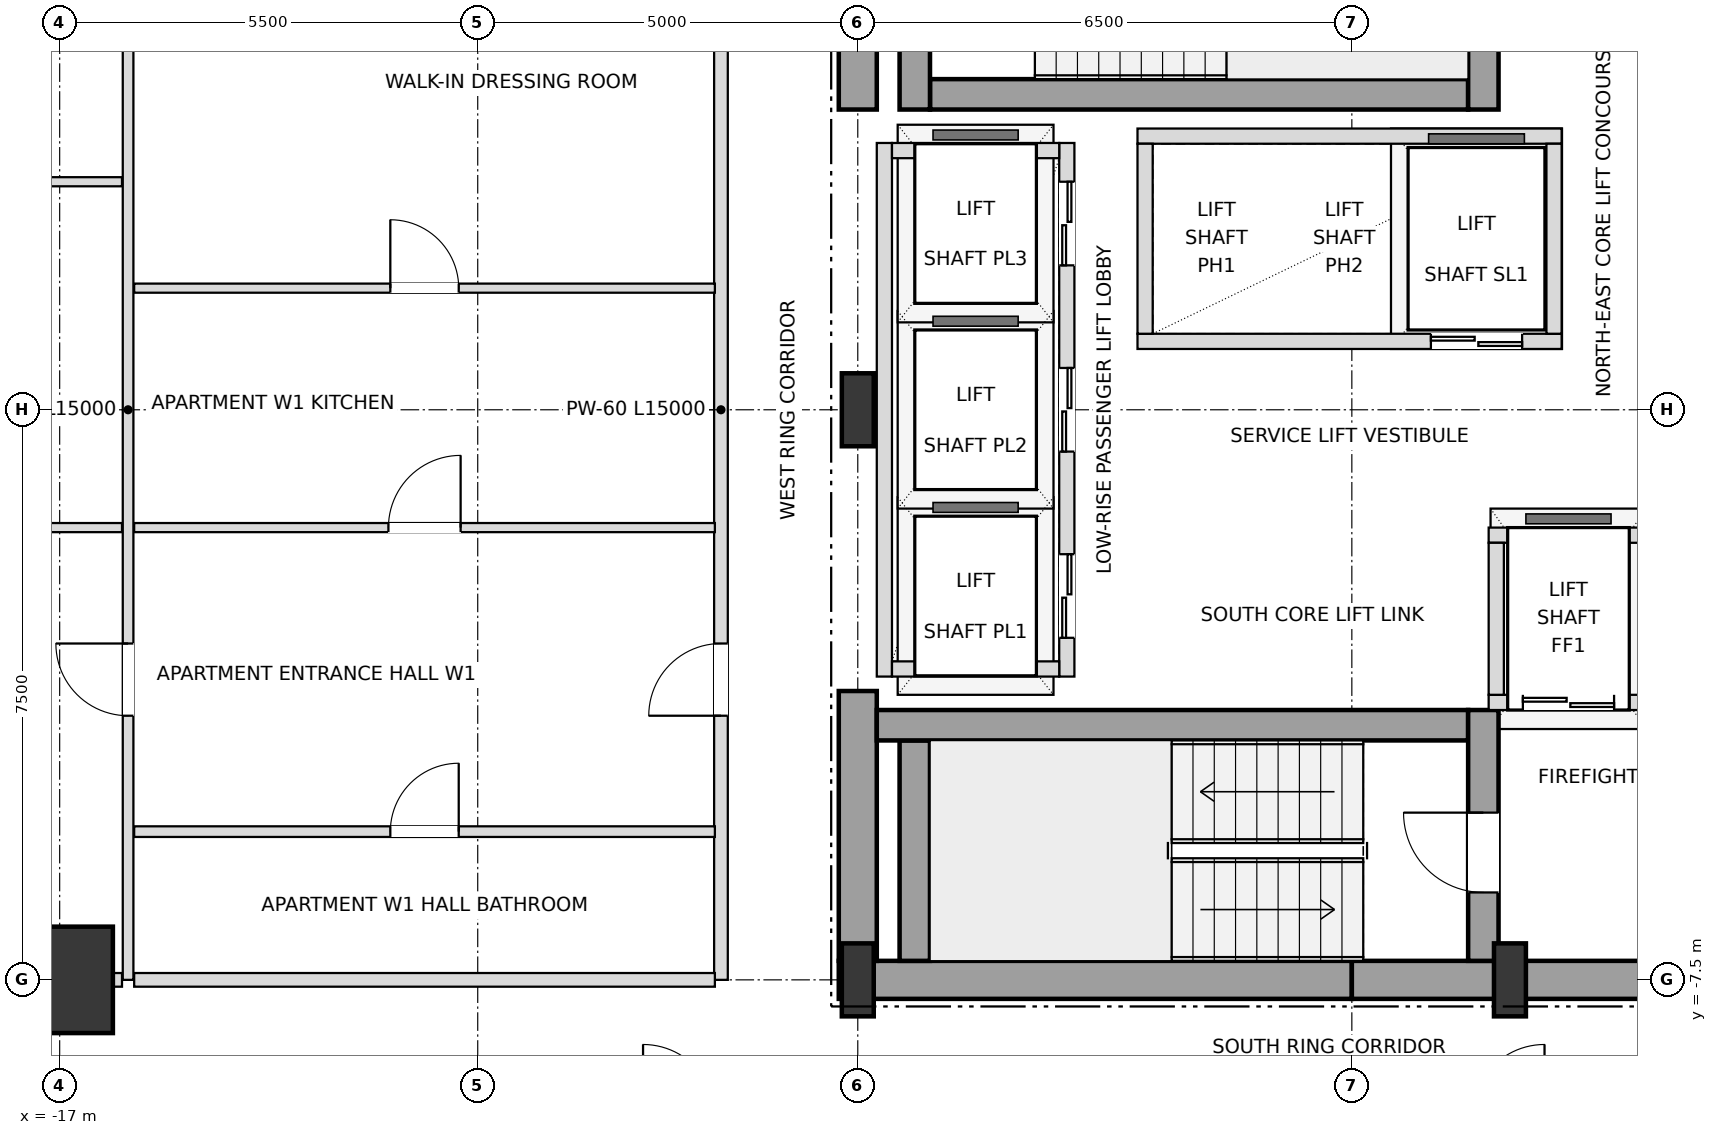
"""IFC4 building model, lengths in metres.
Left out: names, types, materials, properties, quantities, classifications, styles, units other than length and angle.
Written with IfcOpenShell. Run it as: python <this file> out.ifc"""

import sys

from ifc_helpers import new_model, si_unit, direction, frame, frame_2d, origin, origin_2d, place, context, subcontext, project, spatial, rectangle, i_section, extrude, element, fill, save


model = new_model("IFC4")
c1 = context("Model", 3, precision=1e-05, world=origin(), true_north=direction((0.0, 1.0)))
c2 = subcontext(c1, "Body", "Model", "MODEL_VIEW")
j1 = project(units=[si_unit("LENGTHUNIT", "METRE"), si_unit("PLANEANGLEUNIT", "RADIAN")], contexts=[c1])
p1 = place(None, origin())
s1 = spatial("IfcSite", under=j1, at=p1, CompositionType="ELEMENT")
p2 = place(p1, origin())
s2 = spatial("IfcBuilding", under=s1, at=p2, CompositionType="ELEMENT")
p3 = place(p2, frame((0.0, 0.0, 64.8)))
s3 = spatial("IfcBuildingStorey", under=s2, at=p3, CompositionType="ELEMENT", Elevation=64.8)
for number, where, z_axis, x_axis in (
    (1, (-6.5, -7.5, 0.0), (0.0, 0.0, 1.0), (1.0, 0.0, 0.0)),
    (2, (2.08, -7.5, 0.0), (0.0, 0.0, 1.0), (1.0, 0.0, 0.0)),
    (3, (-6.5, 0.0, 0.0), (0.0, 0.0, 1.0), (1.0, 0.0, 0.0)),
):
    element("IfcColumn", number, at=place(p3, frame(where, z_axis=z_axis, x_axis=x_axis)), inside=s3, PredefinedType="COLUMN", context=c2, shape_type="SweptSolid", body=[
        extrude(i_section(OverallWidth=0.42, OverallDepth=0.96, WebThickness=0.022, FlangeThickness=0.034, at=origin_2d()), origin(), (0.0, 0.0, 1.0), 3.6),
    ])
p4 = place(p3, frame((-17.0, -7.5, 0.0), z_axis=(0.0, 0.0, 1.0), x_axis=(1.0, 0.0, 0.0)))
e4 = element("IfcColumn", 4, at=p4, inside=s3, PredefinedType="USERDEFINED", context=c2, shape_type="SweptSolid", body=[
    extrude(rectangle(XDim=1.4, YDim=1.4, at=origin_2d()), origin(), (0.0, 0.0, 1.0), 3.6),
])
for number, where, z_axis, x_axis in (
    (5, (-6.75, -7.5, 0.0), (0.0, 0.0, 1.0), (1.0, 0.0, 0.0)),
    (6, (0.0, -7.5, 0.0), (0.0, 0.0, 1.0), (1.0, 0.0, 0.0)),
):
    element("IfcWall", number, at=place(p3, frame(where, z_axis=z_axis, x_axis=x_axis)), inside=s3, PredefinedType="SHEAR", context=c2, shape_type="SweptSolid", body=[
        extrude(rectangle(XDim=6.75, YDim=0.5, at=frame_2d((3.375, 0.0))), origin(), (0.0, 0.0, 1.0), 3.38),
    ])
p5 = place(p3, frame((-6.5, -7.25, 0.0), z_axis=(0.0, 0.0, 1.0), x_axis=(0.0, 1.0, 0.0)))
e7 = element("IfcWall", 7, at=p5, inside=s3, PredefinedType="SHEAR", context=c2, shape_type="SweptSolid", body=[
    extrude(rectangle(XDim=3.55, YDim=0.5, at=frame_2d((1.775, 0.0))), origin(), (0.0, 0.0, 1.0), 3.38),
])
p6 = place(p3, frame((-6.5, 3.95, 0.0), z_axis=(0.0, 0.0, 1.0), x_axis=(0.0, 1.0, 0.0)))
e8 = element("IfcWall", 8, at=p6, inside=s3, PredefinedType="SHEAR", context=c2, shape_type="SweptSolid", body=[
    extrude(rectangle(XDim=3.3, YDim=0.5, at=frame_2d((1.65, 0.0))), origin(), (0.0, 0.0, 1.0), 3.38),
])
p7 = place(p3, frame((-5.75, -7.25, 0.0), z_axis=(0.0, 0.0, 1.0), x_axis=(0.0, 1.0, 0.0)))
e9 = element("IfcWall", 9, at=p7, inside=s3, PredefinedType="SHEAR", context=c2, shape_type="SweptSolid", body=[
    extrude(rectangle(XDim=2.9, YDim=0.4, at=frame_2d((1.45, 0.0))), origin(), (0.0, 0.0, 1.0), 3.38),
])
p8 = place(p3, frame((-6.25, -4.15, 0.0), z_axis=(0.0, 0.0, 1.0), x_axis=(1.0, 0.0, 0.0)))
e10 = element("IfcWall", 10, at=p8, inside=s3, PredefinedType="SHEAR", context=c2, shape_type="SweptSolid", body=[
    extrude(rectangle(XDim=7.78, YDim=0.4, at=frame_2d((3.89, 0.0))), origin(), (0.0, 0.0, 1.0), 3.38),
])
p9 = place(p3, frame((1.73, -7.25, 0.0), z_axis=(0.0, 0.0, 1.0), x_axis=(0.0, 1.0, 0.0)))
e11 = element("IfcWall", 11, at=p9, inside=s3, PredefinedType="SHEAR", context=c2, shape_type="SweptSolid", body=[
    extrude(rectangle(XDim=3.3, YDim=0.4, at=frame_2d((1.65, 0.0))), origin(), (0.0, 0.0, 1.0), 3.38),
])
p10 = place(p9, frame((0.9, 0.0, 0.0)))
e12 = element("IfcOpeningElement", 12, at=p10, cuts=e11, PredefinedType="OPENING", context=c2, shape_type="SweptSolid", body=[
    extrude(rectangle(XDim=1.05, YDim=2.15, at=frame_2d((0.525, 1.075))), frame((0.0, 0.21, 0.0), z_axis=(0.0, -1.0, 0.0), x_axis=(1.0, 0.0, 0.0)), (0.0, 0.0, 1.0), 0.42),
])
p11 = place(p3, frame((-5.55, 4.15, 0.0), z_axis=(0.0, 0.0, 1.0), x_axis=(1.0, 0.0, 0.0)))
e13 = element("IfcWall", 13, at=p11, inside=s3, PredefinedType="SHEAR", context=c2, shape_type="SweptSolid", body=[
    extrude(rectangle(XDim=7.08, YDim=0.4, at=frame_2d((3.54, 0.0))), origin(), (0.0, 0.0, 1.0), 3.38),
])
for number, where, z_axis, x_axis in (
    (14, (1.73, 3.95, 0.0), (0.0, 0.0, 1.0), (0.0, 1.0, 0.0)),
    (15, (-5.75, 3.95, 0.0), (0.0, 0.0, 1.0), (0.0, 1.0, 0.0)),
):
    element("IfcWall", number, at=place(p3, frame(where, z_axis=z_axis, x_axis=x_axis)), inside=s3, PredefinedType="SHEAR", context=c2, shape_type="SweptSolid", body=[
        extrude(rectangle(XDim=3.3, YDim=0.4, at=frame_2d((1.65, 0.0))), origin(), (0.0, 0.0, 1.0), 3.38),
    ])
p12 = place(p3, frame((-3.75, -3.51, 0.0), z_axis=(0.0, 0.0, 1.0), x_axis=(0.0, 1.0, 0.0)))
e16 = element("IfcWall", 16, at=p12, inside=s3, PredefinedType="SOLIDWALL", context=c2, shape_type="SweptSolid", body=[
    extrude(rectangle(XDim=7.02, YDim=0.2, at=frame_2d((3.51, 0.0))), origin(), (0.0, 0.0, 1.0), 3.38),
])
p13 = place(p12, frame((0.51, 0.0, 0.0)))
e17 = element("IfcOpeningElement", 17, at=p13, cuts=e16, PredefinedType="OPENING", context=c2, shape_type="SweptSolid", body=[
    extrude(rectangle(XDim=1.1, YDim=2.15, at=frame_2d((0.55, 1.075))), frame((0.0, 0.11, 0.0), z_axis=(0.0, -1.0, 0.0), x_axis=(1.0, 0.0, 0.0)), (0.0, 0.0, 1.0), 0.22),
])
p14 = place(p12, frame((2.96, 0.0, 0.0)))
e18 = element("IfcOpeningElement", 18, at=p14, cuts=e16, PredefinedType="OPENING", context=c2, shape_type="SweptSolid", body=[
    extrude(rectangle(XDim=1.1, YDim=2.15, at=frame_2d((0.55, 1.075))), frame((0.0, 0.11, 0.0), z_axis=(0.0, -1.0, 0.0), x_axis=(1.0, 0.0, 0.0)), (0.0, 0.0, 1.0), 0.22),
])
p15 = place(p12, frame((5.41, 0.0, 0.0)))
e19 = element("IfcOpeningElement", 19, at=p15, cuts=e16, PredefinedType="OPENING", context=c2, shape_type="SweptSolid", body=[
    extrude(rectangle(XDim=1.1, YDim=2.15, at=frame_2d((0.55, 1.075))), frame((0.0, 0.11, 0.0), z_axis=(0.0, -1.0, 0.0), x_axis=(1.0, 0.0, 0.0)), (0.0, 0.0, 1.0), 0.22),
])
p16 = place(p3, frame((-6.15, -3.51, 0.0), z_axis=(0.0, 0.0, 1.0), x_axis=(0.0, 1.0, 0.0)))
e20 = element("IfcWall", 20, at=p16, inside=s3, PredefinedType="SOLIDWALL", context=c2, shape_type="SweptSolid", body=[
    extrude(rectangle(XDim=7.02, YDim=0.2, at=frame_2d((3.51, 0.0))), origin(), (0.0, 0.0, 1.0), 3.38),
])
for number, where, z_axis, x_axis in (
    (21, (-6.05, -3.41, 0.0), (0.0, 0.0, 1.0), (1.0, 0.0, 0.0)),
    (22, (-6.05, 3.41, 0.0), (0.0, 0.0, 1.0), (1.0, 0.0, 0.0)),
):
    element("IfcWall", number, at=place(p3, frame(where, z_axis=z_axis, x_axis=x_axis)), inside=s3, PredefinedType="SOLIDWALL", context=c2, shape_type="SweptSolid", body=[
        extrude(rectangle(XDim=2.2, YDim=0.2, at=frame_2d((1.1, 0.0))), origin(), (0.0, 0.0, 1.0), 3.38),
    ])
p17 = place(p3, frame((-2.82, 0.9, 0.0), z_axis=(0.0, 0.0, 1.0), x_axis=(1.0, 0.0, 0.0)))
e23 = element("IfcWall", 23, at=p17, inside=s3, PredefinedType="SOLIDWALL", context=c2, shape_type="SweptSolid", body=[
    extrude(rectangle(XDim=5.58, YDim=0.2, at=frame_2d((2.79, 0.0))), origin(), (0.0, 0.0, 1.0), 3.38),
])
p18 = place(p17, frame((3.86, 0.0, 0.0)))
e24 = element("IfcOpeningElement", 24, at=p18, cuts=e23, PredefinedType="OPENING", context=c2, shape_type="SweptSolid", body=[
    extrude(rectangle(XDim=1.2, YDim=2.2, at=frame_2d((0.6, 1.1))), frame((0.0, 0.11, 0.0), z_axis=(0.0, -1.0, 0.0), x_axis=(1.0, 0.0, 0.0)), (0.0, 0.0, 1.0), 0.22),
])
p19 = place(p3, frame((-2.82, 3.6, 0.0), z_axis=(0.0, 0.0, 1.0), x_axis=(1.0, 0.0, 0.0)))
e25 = element("IfcWall", 25, at=p19, inside=s3, PredefinedType="SOLIDWALL", context=c2, shape_type="SweptSolid", body=[
    extrude(rectangle(XDim=5.58, YDim=0.2, at=frame_2d((2.79, 0.0))), origin(), (0.0, 0.0, 1.0), 3.38),
])
for number, where, z_axis, x_axis in (
    (26, (-2.72, 1.0, 0.0), (0.0, 0.0, 1.0), (0.0, 1.0, 0.0)),
    (27, (2.66, 1.0, 0.0), (0.0, 0.0, 1.0), (0.0, 1.0, 0.0)),
):
    element("IfcWall", number, at=place(p3, frame(where, z_axis=z_axis, x_axis=x_axis)), inside=s3, PredefinedType="SOLIDWALL", context=c2, shape_type="SweptSolid", body=[
        extrude(rectangle(XDim=2.5, YDim=0.2, at=frame_2d((1.25, 0.0))), origin(), (0.0, 0.0, 1.0), 3.38),
    ])
p20 = place(p3, frame((1.8, -3.85, 0.0), z_axis=(0.0, 0.0, 1.0), x_axis=(1.0, 0.0, 0.0)))
e28 = element("IfcWall", 28, at=p20, inside=s3, PredefinedType="SOLIDWALL", context=c2, shape_type="SweptSolid", body=[
    extrude(rectangle(XDim=4.1, YDim=0.2, at=frame_2d((2.05, 0.0))), origin(), (0.0, 0.0, 1.0), 3.38),
])
p21 = place(p20, frame((0.45, 0.0, 0.0)))
e29 = element("IfcOpeningElement", 29, at=p21, cuts=e28, PredefinedType="OPENING", context=c2, shape_type="SweptSolid", body=[
    extrude(rectangle(XDim=1.2, YDim=2.2, at=frame_2d((0.6, 1.1))), frame((0.0, 0.11, 0.0), z_axis=(0.0, -1.0, 0.0), x_axis=(1.0, 0.0, 0.0)), (0.0, 0.0, 1.0), 0.22),
])
p22 = place(p20, frame((2.45, 0.0, 0.0)))
e30 = element("IfcOpeningElement", 30, at=p22, cuts=e28, PredefinedType="OPENING", context=c2, shape_type="SweptSolid", body=[
    extrude(rectangle(XDim=1.2, YDim=2.2, at=frame_2d((0.6, 1.1))), frame((0.0, 0.11, 0.0), z_axis=(0.0, -1.0, 0.0), x_axis=(1.0, 0.0, 0.0)), (0.0, 0.0, 1.0), 0.22),
])
p23 = place(p3, frame((1.8, -1.65, 0.0), z_axis=(0.0, 0.0, 1.0), x_axis=(1.0, 0.0, 0.0)))
e31 = element("IfcWall", 31, at=p23, inside=s3, PredefinedType="SOLIDWALL", context=c2, shape_type="SweptSolid", body=[
    extrude(rectangle(XDim=4.1, YDim=0.2, at=frame_2d((2.05, 0.0))), origin(), (0.0, 0.0, 1.0), 3.38),
])
p24 = place(p3, frame((1.9, -3.75, 0.0), z_axis=(0.0, 0.0, 1.0), x_axis=(0.0, 1.0, 0.0)))
e32 = element("IfcWall", 32, at=p24, inside=s3, PredefinedType="SOLIDWALL", context=c2, shape_type="SweptSolid", body=[
    extrude(rectangle(XDim=2.0, YDim=0.2, at=frame_2d((1.0, 0.0))), origin(), (0.0, 0.0, 1.0), 3.38),
])
p25 = place(p3, frame((-16.1, -7.5, 0.0), z_axis=(0.0, 0.0, 1.0), x_axis=(0.0, 1.0, 0.0)))
e33 = element("IfcWall", 33, at=p25, inside=s3, PredefinedType="PARTITIONING", context=c2, shape_type="SweptSolid", body=[
    extrude(rectangle(XDim=15.0, YDim=0.14, at=frame_2d((7.5, 0.0))), origin(), (0.0, 0.0, 1.0), 3.38),
])
p26 = place(p25, frame((3.475, 0.0, 0.0)))
e34 = element("IfcOpeningElement", 34, at=p26, cuts=e33, PredefinedType="OPENING", context=c2, shape_type="SweptSolid", body=[
    extrude(rectangle(XDim=0.95, YDim=2.1, at=frame_2d((0.475, 1.05))), frame((0.0, 0.08, 0.0), z_axis=(0.0, -1.0, 0.0), x_axis=(1.0, 0.0, 0.0)), (0.0, 0.0, 1.0), 0.16),
])
p27 = place(p3, frame((-8.3, -7.5, 0.0), z_axis=(0.0, 0.0, 1.0), x_axis=(0.0, 1.0, 0.0)))
e35 = element("IfcWall", 35, at=p27, inside=s3, PredefinedType="PARTITIONING", context=c2, shape_type="SweptSolid", body=[
    extrude(rectangle(XDim=15.0, YDim=0.18, at=frame_2d((7.5, 0.0))), origin(), (0.0, 0.0, 1.0), 3.38),
])
p28 = place(p27, frame((3.475, 0.0, 0.0)))
e36 = element("IfcOpeningElement", 36, at=p28, cuts=e35, PredefinedType="OPENING", context=c2, shape_type="SweptSolid", body=[
    extrude(rectangle(XDim=0.95, YDim=2.15, at=frame_2d((0.475, 1.075))), frame((0.0, 0.1, 0.0), z_axis=(0.0, -1.0, 0.0), x_axis=(1.0, 0.0, 0.0)), (0.0, 0.0, 1.0), 0.2),
])
p29 = place(p3, frame((-21.9, -7.5, 0.0), z_axis=(0.0, 0.0, 1.0), x_axis=(1.0, 0.0, 0.0)))
e37 = element("IfcWall", 37, at=p29, inside=s3, PredefinedType="PARTITIONING", context=c2, shape_type="SweptSolid", body=[
    extrude(rectangle(XDim=5.72, YDim=0.18, at=frame_2d((2.86, 0.0))), origin(), (0.0, 0.0, 1.0), 2.816),
])
p30 = place(p3, frame((-16.02, -7.5, 0.0), z_axis=(0.0, 0.0, 1.0), x_axis=(1.0, 0.0, 0.0)))
e38 = element("IfcWall", 38, at=p30, inside=s3, PredefinedType="PARTITIONING", context=c2, shape_type="SweptSolid", body=[
    extrude(rectangle(XDim=7.64, YDim=0.18, at=frame_2d((3.82, 0.0))), origin(), (0.0, 0.0, 1.0), 2.816),
])
p31 = place(p3, frame((-16.02, -5.55, 0.0), z_axis=(0.0, 0.0, 1.0), x_axis=(1.0, 0.0, 0.0)))
e39 = element("IfcWall", 39, at=p31, inside=s3, PredefinedType="PARTITIONING", context=c2, shape_type="SweptSolid", body=[
    extrude(rectangle(XDim=7.64, YDim=0.14, at=frame_2d((3.82, 0.0))), origin(), (0.0, 0.0, 1.0), 2.948),
])
p32 = place(p31, frame((3.37, 0.0, 0.0)))
e40 = element("IfcOpeningElement", 40, at=p32, cuts=e39, PredefinedType="OPENING", context=c2, shape_type="SweptSolid", body=[
    extrude(rectangle(XDim=0.9, YDim=2.1, at=frame_2d((0.45, 1.05))), frame((0.0, 0.08, 0.0), z_axis=(0.0, -1.0, 0.0), x_axis=(1.0, 0.0, 0.0)), (0.0, 0.0, 1.0), 0.16),
])
p33 = place(p3, frame((-21.82, -1.55, 0.0), z_axis=(0.0, 0.0, 1.0), x_axis=(1.0, 0.0, 0.0)))
e41 = element("IfcWall", 41, at=p33, inside=s3, PredefinedType="PARTITIONING", context=c2, shape_type="SweptSolid", body=[
    extrude(rectangle(XDim=5.64, YDim=0.12, at=frame_2d((2.82, 0.0))), origin(), (0.0, 0.0, 1.0), 2.816),
])
p34 = place(p33, frame((2.37, 0.0, 0.0)))
e42 = element("IfcOpeningElement", 42, at=p34, cuts=e41, PredefinedType="OPENING", context=c2, shape_type="SweptSolid", body=[
    extrude(rectangle(XDim=0.9, YDim=2.1, at=frame_2d((0.45, 1.05))), frame((0.0, 0.07, 0.0), z_axis=(0.0, -1.0, 0.0), x_axis=(1.0, 0.0, 0.0)), (0.0, 0.0, 1.0), 0.14),
])
p35 = place(p3, frame((-16.02, -1.55, 0.0), z_axis=(0.0, 0.0, 1.0), x_axis=(1.0, 0.0, 0.0)))
e43 = element("IfcWall", 43, at=p35, inside=s3, PredefinedType="PARTITIONING", context=c2, shape_type="SweptSolid", body=[
    extrude(rectangle(XDim=7.64, YDim=0.12, at=frame_2d((3.82, 0.0))), origin(), (0.0, 0.0, 1.0), 2.948),
])
p36 = place(p35, frame((3.345, 0.0, 0.0)))
e44 = element("IfcOpeningElement", 44, at=p36, cuts=e43, PredefinedType="OPENING", context=c2, shape_type="SweptSolid", body=[
    extrude(rectangle(XDim=0.95, YDim=2.1, at=frame_2d((0.475, 1.05))), frame((0.0, 0.07, 0.0), z_axis=(0.0, -1.0, 0.0), x_axis=(1.0, 0.0, 0.0)), (0.0, 0.0, 1.0), 0.14),
])
p37 = place(p3, frame((-16.02, 1.6, 0.0), z_axis=(0.0, 0.0, 1.0), x_axis=(1.0, 0.0, 0.0)))
e45 = element("IfcWall", 45, at=p37, inside=s3, PredefinedType="PARTITIONING", context=c2, shape_type="SweptSolid", body=[
    extrude(rectangle(XDim=7.64, YDim=0.12, at=frame_2d((3.82, 0.0))), origin(), (0.0, 0.0, 1.0), 2.948),
])
p38 = place(p37, frame((3.37, 0.0, 0.0)))
e46 = element("IfcOpeningElement", 46, at=p38, cuts=e45, PredefinedType="OPENING", context=c2, shape_type="SweptSolid", body=[
    extrude(rectangle(XDim=0.9, YDim=2.1, at=frame_2d((0.45, 1.05))), frame((0.0, 0.07, 0.0), z_axis=(0.0, -1.0, 0.0), x_axis=(1.0, 0.0, 0.0)), (0.0, 0.0, 1.0), 0.14),
])
p39 = place(p3, frame((-21.82, 3.0, 0.0), z_axis=(0.0, 0.0, 1.0), x_axis=(1.0, 0.0, 0.0)))
e47 = element("IfcWall", 47, at=p39, inside=s3, PredefinedType="PARTITIONING", context=c2, shape_type="SweptSolid", body=[
    extrude(rectangle(XDim=5.64, YDim=0.12, at=frame_2d((2.82, 0.0))), origin(), (0.0, 0.0, 1.0), 2.816),
])
p40 = place(p39, frame((2.37, 0.0, 0.0)))
e48 = element("IfcOpeningElement", 48, at=p40, cuts=e47, PredefinedType="OPENING", context=c2, shape_type="SweptSolid", body=[
    extrude(rectangle(XDim=0.9, YDim=2.1, at=frame_2d((0.45, 1.05))), frame((0.0, 0.07, 0.0), z_axis=(0.0, -1.0, 0.0), x_axis=(1.0, 0.0, 0.0)), (0.0, 0.0, 1.0), 0.14),
])
p41 = place(p10, origin())
e49 = element("IfcDoor", 49, at=p41, inside=s3, OperationType="SINGLE_SWING_RIGHT", PredefinedType="DOOR", context=c2, shape_type="SweptSolid", body=[
    extrude(rectangle(XDim=1.05, YDim=2.15, at=frame_2d((0.525, 1.075))), frame((0.0, 0.025, 0.0), z_axis=(0.0, -1.0, 0.0), x_axis=(1.0, 0.0, 0.0)), (0.0, 0.0, 1.0), 0.05),
])
fill(e12, e49)
p42 = place(p13, origin())
e50 = element("IfcDoor", 50, at=p42, inside=s3, OperationType="DOUBLE_DOOR_SLIDING", PredefinedType="DOOR", context=c2, shape_type="SweptSolid", body=[
    extrude(rectangle(XDim=1.1, YDim=2.15, at=frame_2d((0.55, 1.075))), frame((0.0, 0.025, 0.0), z_axis=(0.0, -1.0, 0.0), x_axis=(1.0, 0.0, 0.0)), (0.0, 0.0, 1.0), 0.05),
])
fill(e17, e50)
p43 = place(p14, origin())
e51 = element("IfcDoor", 51, at=p43, inside=s3, OperationType="DOUBLE_DOOR_SLIDING", PredefinedType="DOOR", context=c2, shape_type="SweptSolid", body=[
    extrude(rectangle(XDim=1.1, YDim=2.15, at=frame_2d((0.55, 1.075))), frame((0.0, 0.025, 0.0), z_axis=(0.0, -1.0, 0.0), x_axis=(1.0, 0.0, 0.0)), (0.0, 0.0, 1.0), 0.05),
])
fill(e18, e51)
p44 = place(p15, origin())
e52 = element("IfcDoor", 52, at=p44, inside=s3, OperationType="DOUBLE_DOOR_SLIDING", PredefinedType="DOOR", context=c2, shape_type="SweptSolid", body=[
    extrude(rectangle(XDim=1.1, YDim=2.15, at=frame_2d((0.55, 1.075))), frame((0.0, 0.025, 0.0), z_axis=(0.0, -1.0, 0.0), x_axis=(1.0, 0.0, 0.0)), (0.0, 0.0, 1.0), 0.05),
])
fill(e19, e52)
p45 = place(p18, origin())
e53 = element("IfcDoor", 53, at=p45, inside=s3, OperationType="DOUBLE_DOOR_SLIDING", PredefinedType="DOOR", context=c2, shape_type="SweptSolid", body=[
    extrude(rectangle(XDim=1.2, YDim=2.2, at=frame_2d((0.6, 1.1))), frame((0.0, 0.025, 0.0), z_axis=(0.0, -1.0, 0.0), x_axis=(1.0, 0.0, 0.0)), (0.0, 0.0, 1.0), 0.05),
])
fill(e24, e53)
p46 = place(p21, origin())
e54 = element("IfcDoor", 54, at=p46, inside=s3, OperationType="DOUBLE_DOOR_SLIDING", PredefinedType="DOOR", context=c2, shape_type="SweptSolid", body=[
    extrude(rectangle(XDim=1.2, YDim=2.2, at=frame_2d((0.6, 1.1))), frame((0.0, 0.025, 0.0), z_axis=(0.0, -1.0, 0.0), x_axis=(1.0, 0.0, 0.0)), (0.0, 0.0, 1.0), 0.05),
])
fill(e29, e54)
p47 = place(p32, origin())
e55 = element("IfcDoor", 55, at=p47, inside=s3, OperationType="SINGLE_SWING_RIGHT", PredefinedType="DOOR", context=c2, shape_type="SweptSolid", body=[
    extrude(rectangle(XDim=0.9, YDim=2.1, at=frame_2d((0.45, 1.05))), frame((0.0, 0.025, 0.0), z_axis=(0.0, -1.0, 0.0), x_axis=(1.0, 0.0, 0.0)), (0.0, 0.0, 1.0), 0.05),
])
fill(e40, e55)
p48 = place(p28, origin())
e56 = element("IfcDoor", 56, at=p48, inside=s3, OperationType="SINGLE_SWING_LEFT", PredefinedType="DOOR", context=c2, shape_type="SweptSolid", body=[
    extrude(rectangle(XDim=0.95, YDim=2.15, at=frame_2d((0.475, 1.075))), frame((0.0, 0.025, 0.0), z_axis=(0.0, -1.0, 0.0), x_axis=(1.0, 0.0, 0.0)), (0.0, 0.0, 1.0), 0.05),
])
fill(e36, e56)
p49 = place(p36, origin())
e57 = element("IfcDoor", 57, at=p49, inside=s3, OperationType="SINGLE_SWING_RIGHT", PredefinedType="DOOR", context=c2, shape_type="SweptSolid", body=[
    extrude(rectangle(XDim=0.95, YDim=2.1, at=frame_2d((0.475, 1.05))), frame((0.0, 0.025, 0.0), z_axis=(0.0, -1.0, 0.0), x_axis=(1.0, 0.0, 0.0)), (0.0, 0.0, 1.0), 0.05),
])
fill(e44, e57)
p50 = place(p38, origin())
e58 = element("IfcDoor", 58, at=p50, inside=s3, OperationType="SINGLE_SWING_LEFT", PredefinedType="DOOR", context=c2, shape_type="SweptSolid", body=[
    extrude(rectangle(XDim=0.9, YDim=2.1, at=frame_2d((0.45, 1.05))), frame((0.0, 0.025, 0.0), z_axis=(0.0, -1.0, 0.0), x_axis=(1.0, 0.0, 0.0)), (0.0, 0.0, 1.0), 0.05),
])
fill(e46, e58)
p51 = place(p26, origin())
e59 = element("IfcDoor", 59, at=p51, inside=s3, OperationType="SINGLE_SWING_RIGHT", PredefinedType="DOOR", context=c2, shape_type="SweptSolid", body=[
    extrude(rectangle(XDim=0.95, YDim=2.1, at=frame_2d((0.475, 1.05))), frame((0.0, 0.025, 0.0), z_axis=(0.0, -1.0, 0.0), x_axis=(1.0, 0.0, 0.0)), (0.0, 0.0, 1.0), 0.05),
])
fill(e34, e59)
save(model, sys.argv[1])
